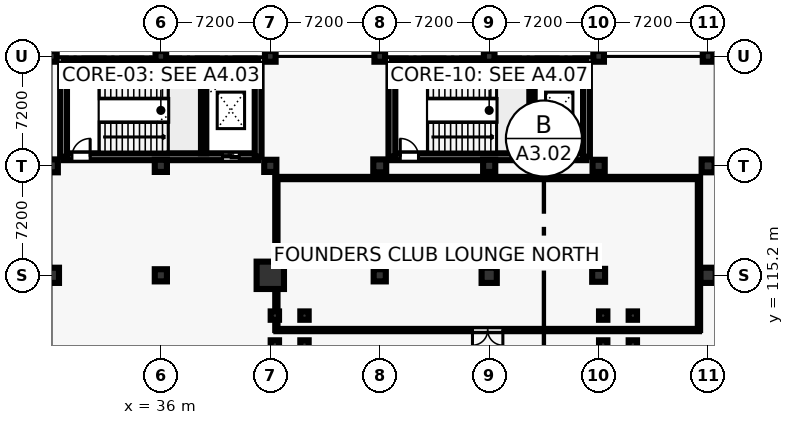
"""IFC4 building model, lengths in metres.
Left out: names, types, materials, properties, quantities, classifications, styles, units other than length and angle.
Written with IfcOpenShell. Run it as: python <this file> out.ifc"""

import sys

from ifc_helpers import new_model, si_unit, direction, frame, frame_2d, origin, origin_2d, place, context, subcontext, project, spatial, rectangle, circle, extrude, element, fill, save


model = new_model("IFC4")
c1 = context("Model", 3, precision=1e-05, world=origin(), true_north=direction((0.0, 1.0)))
c2 = subcontext(c1, "Body", "Model", "MODEL_VIEW")
j1 = project(units=[si_unit("LENGTHUNIT", "METRE"), si_unit("PLANEANGLEUNIT", "RADIAN")], contexts=[c1])
p1 = place(None, origin())
s1 = spatial("IfcSite", under=j1, at=p1, CompositionType="ELEMENT")
p2 = place(p1, origin())
s2 = spatial("IfcBuilding", under=s1, at=p2, CompositionType="ELEMENT")
p3 = place(p2, frame((0.0, 0.0, 5.4)))
s3 = spatial("IfcBuildingStorey", under=s2, at=p3, CompositionType="ELEMENT", Elevation=5.4)
p4 = place(p3, frame((28.8, 115.2, 0.0), z_axis=(0.0, 0.0, 1.0), x_axis=(1.0, 0.0, 0.0)))
e1 = element("IfcColumn", 1, at=p4, inside=s3, PredefinedType="COLUMN", context=c2, shape_type="SweptSolid", body=[
    extrude(circle(Radius=0.5, at=origin_2d()), origin(), (0.0, 0.0, 1.0), 4.2),
])
p5 = place(p3, frame((28.8, 122.4, 0.0), z_axis=(0.0, 0.0, 1.0), x_axis=(1.0, 0.0, 0.0)))
e2 = element("IfcColumn", 2, at=p5, inside=s3, PredefinedType="COLUMN", context=c2, shape_type="SweptSolid", body=[
    extrude(rectangle(XDim=0.85, YDim=0.85, at=origin_2d()), origin(), (0.0, 0.0, 1.0), 4.2),
])
p6 = place(p3, frame((28.8, 129.6, 0.0), z_axis=(0.0, 0.0, 1.0), x_axis=(1.0, 0.0, 0.0)))
e3 = element("IfcColumn", 3, at=p6, inside=s3, PredefinedType="COLUMN", context=c2, shape_type="SweptSolid", body=[
    extrude(rectangle(XDim=0.7, YDim=0.7, at=origin_2d()), origin(), (0.0, 0.0, 1.0), 4.2),
])
p7 = place(p3, frame((36.0, 115.2, 0.0), z_axis=(0.0, 0.0, 1.0), x_axis=(1.0, 0.0, 0.0)))
e4 = element("IfcColumn", 4, at=p7, inside=s3, PredefinedType="COLUMN", context=c2, shape_type="SweptSolid", body=[
    extrude(rectangle(XDim=0.8, YDim=0.8, at=origin_2d()), origin(), (0.0, 0.0, 1.0), 4.2),
])
p8 = place(p3, frame((36.0, 122.4, 0.0), z_axis=(0.0, 0.0, 1.0), x_axis=(1.0, 0.0, 0.0)))
e5 = element("IfcColumn", 5, at=p8, inside=s3, PredefinedType="COLUMN", context=c2, shape_type="SweptSolid", body=[
    extrude(circle(Radius=0.4, at=origin_2d()), origin(), (0.0, 0.0, 1.0), 4.2),
])
p9 = place(p3, frame((36.0, 129.6, 0.0), z_axis=(0.0, 0.0, 1.0), x_axis=(1.0, 0.0, 0.0)))
e6 = element("IfcColumn", 6, at=p9, inside=s3, PredefinedType="COLUMN", context=c2, shape_type="SweptSolid", body=[
    extrude(rectangle(XDim=0.7, YDim=0.7, at=origin_2d()), origin(), (0.0, 0.0, 1.0), 4.2),
])
p10 = place(p3, frame((43.2, 115.2, 0.0), z_axis=(0.0, 0.0, 1.0), x_axis=(1.0, 0.0, 0.0)))
e7 = element("IfcColumn", 7, at=p10, inside=s3, PredefinedType="COLUMN", context=c2, shape_type="SweptSolid", body=[
    extrude(circle(Radius=0.9, at=origin_2d()), origin(), (0.0, 0.0, 1.0), 4.2),
])
p11 = place(p3, frame((43.2, 122.4, 0.0), z_axis=(0.0, 0.0, 1.0), x_axis=(1.0, 0.0, 0.0)))
e8 = element("IfcColumn", 8, at=p11, inside=s3, PredefinedType="COLUMN", context=c2, shape_type="SweptSolid", body=[
    extrude(rectangle(XDim=0.8, YDim=0.8, at=origin_2d()), origin(), (0.0, 0.0, 1.0), 4.2),
])
p12 = place(p3, frame((43.2, 129.6, 0.0), z_axis=(0.0, 0.0, 1.0), x_axis=(1.0, 0.0, 0.0)))
e9 = element("IfcColumn", 9, at=p12, inside=s3, PredefinedType="COLUMN", context=c2, shape_type="SweptSolid", body=[
    extrude(rectangle(XDim=0.7, YDim=0.7, at=origin_2d()), origin(), (0.0, 0.0, 1.0), 4.2),
])
p13 = place(p3, frame((50.4, 115.2, 0.0), z_axis=(0.0, 0.0, 1.0), x_axis=(1.0, 0.0, 0.0)))
e10 = element("IfcColumn", 10, at=p13, inside=s3, PredefinedType="COLUMN", context=c2, shape_type="SweptSolid", body=[
    extrude(circle(Radius=0.4, at=origin_2d()), origin(), (0.0, 0.0, 1.0), 4.2),
])
p14 = place(p3, frame((50.4, 122.4, 0.0), z_axis=(0.0, 0.0, 1.0), x_axis=(1.0, 0.0, 0.0)))
e11 = element("IfcColumn", 11, at=p14, inside=s3, PredefinedType="COLUMN", context=c2, shape_type="SweptSolid", body=[
    extrude(rectangle(XDim=0.85, YDim=0.85, at=origin_2d()), origin(), (0.0, 0.0, 1.0), 4.2),
])
p15 = place(p3, frame((50.4, 129.6, 0.0), z_axis=(0.0, 0.0, 1.0), x_axis=(1.0, 0.0, 0.0)))
e12 = element("IfcColumn", 12, at=p15, inside=s3, PredefinedType="COLUMN", context=c2, shape_type="SweptSolid", body=[
    extrude(rectangle(XDim=0.7, YDim=0.7, at=origin_2d()), origin(), (0.0, 0.0, 1.0), 4.2),
])
p16 = place(p3, frame((57.6, 115.2, 0.0), z_axis=(0.0, 0.0, 1.0), x_axis=(1.0, 0.0, 0.0)))
e13 = element("IfcColumn", 13, at=p16, inside=s3, PredefinedType="COLUMN", context=c2, shape_type="SweptSolid", body=[
    extrude(circle(Radius=0.5, at=origin_2d()), origin(), (0.0, 0.0, 1.0), 4.2),
])
p17 = place(p3, frame((57.6, 122.4, 0.0), z_axis=(0.0, 0.0, 1.0), x_axis=(1.0, 0.0, 0.0)))
e14 = element("IfcColumn", 14, at=p17, inside=s3, PredefinedType="COLUMN", context=c2, shape_type="SweptSolid", body=[
    extrude(circle(Radius=0.4, at=origin_2d()), origin(), (0.0, 0.0, 1.0), 4.2),
])
p18 = place(p3, frame((57.6, 129.6, 0.0), z_axis=(0.0, 0.0, 1.0), x_axis=(1.0, 0.0, 0.0)))
e15 = element("IfcColumn", 15, at=p18, inside=s3, PredefinedType="COLUMN", context=c2, shape_type="SweptSolid", body=[
    extrude(rectangle(XDim=0.7, YDim=0.7, at=origin_2d()), origin(), (0.0, 0.0, 1.0), 4.2),
])
p19 = place(p3, frame((64.8, 115.2, 0.0), z_axis=(0.0, 0.0, 1.0), x_axis=(1.0, 0.0, 0.0)))
e16 = element("IfcColumn", 16, at=p19, inside=s3, PredefinedType="COLUMN", context=c2, shape_type="SweptSolid", body=[
    extrude(rectangle(XDim=0.85, YDim=0.85, at=origin_2d()), origin(), (0.0, 0.0, 1.0), 4.2),
])
p20 = place(p3, frame((64.8, 122.4, 0.0), z_axis=(0.0, 0.0, 1.0), x_axis=(1.0, 0.0, 0.0)))
e17 = element("IfcColumn", 17, at=p20, inside=s3, PredefinedType="COLUMN", context=c2, shape_type="SweptSolid", body=[
    extrude(rectangle(XDim=0.8, YDim=0.8, at=origin_2d()), origin(), (0.0, 0.0, 1.0), 4.2),
])
p21 = place(p3, frame((64.8, 129.6, 0.0), z_axis=(0.0, 0.0, 1.0), x_axis=(1.0, 0.0, 0.0)))
e18 = element("IfcColumn", 18, at=p21, inside=s3, PredefinedType="COLUMN", context=c2, shape_type="SweptSolid", body=[
    extrude(rectangle(XDim=0.7, YDim=0.7, at=origin_2d()), origin(), (0.0, 0.0, 1.0), 4.2),
])
p22 = place(p3, frame((72.0, 115.2, 0.0), z_axis=(0.0, 0.0, 1.0), x_axis=(1.0, 0.0, 0.0)))
e19 = element("IfcColumn", 19, at=p22, inside=s3, PredefinedType="COLUMN", context=c2, shape_type="SweptSolid", body=[
    extrude(circle(Radius=0.5, at=origin_2d()), origin(), (0.0, 0.0, 1.0), 4.2),
])
p23 = place(p3, frame((72.0, 122.4, 0.0), z_axis=(0.0, 0.0, 1.0), x_axis=(1.0, 0.0, 0.0)))
e20 = element("IfcColumn", 20, at=p23, inside=s3, PredefinedType="COLUMN", context=c2, shape_type="SweptSolid", body=[
    extrude(rectangle(XDim=0.85, YDim=0.85, at=origin_2d()), origin(), (0.0, 0.0, 1.0), 4.2),
])
p24 = place(p3, frame((72.0, 129.6, 0.0), z_axis=(0.0, 0.0, 1.0), x_axis=(1.0, 0.0, 0.0)))
e21 = element("IfcColumn", 21, at=p24, inside=s3, PredefinedType="COLUMN", context=c2, shape_type="SweptSolid", body=[
    extrude(rectangle(XDim=0.7, YDim=0.7, at=origin_2d()), origin(), (0.0, 0.0, 1.0), 4.2),
])
p25 = place(p3, frame((29.6, 123.0, 0.0), z_axis=(0.0, 0.0, 1.0), x_axis=(1.0, 0.0, 0.0)))
e22 = element("IfcWall", 22, at=p25, inside=s3, PredefinedType="SHEAR", context=c2, shape_type="SweptSolid", body=[
    extrude(rectangle(XDim=12.8, YDim=0.45, at=frame_2d((6.4, 0.0))), origin(), (0.0, 0.0, 1.0), 3.92),
])
p26 = place(p25, frame((0.55, 0.0, 0.0)))
e23 = element("IfcOpeningElement", 23, at=p26, cuts=e22, PredefinedType="OPENING", context=c2, shape_type="SweptSolid", body=[
    extrude(rectangle(XDim=1.2, YDim=2.25, at=frame_2d((0.6, 1.125))), frame((0.0, 0.235, 0.0), z_axis=(0.0, -1.0, 0.0), x_axis=(1.0, 0.0, 0.0)), (0.0, 0.0, 1.0), 0.47),
])
p27 = place(p25, frame((10.458, 0.0, 0.0)))
e24 = element("IfcOpeningElement", 24, at=p27, cuts=e22, PredefinedType="OPENING", context=c2, shape_type="SweptSolid", body=[
    extrude(rectangle(XDim=1.1, YDim=2.2, at=frame_2d((0.55, 1.1))), frame((0.0, 0.235, 0.0), z_axis=(0.0, -1.0, 0.0), x_axis=(1.0, 0.0, 0.0)), (0.0, 0.0, 1.0), 0.47),
])
p28 = place(p3, frame((29.6, 129.1, 0.0), z_axis=(0.0, 0.0, 1.0), x_axis=(1.0, 0.0, 0.0)))
e25 = element("IfcWall", 25, at=p28, inside=s3, PredefinedType="SHEAR", context=c2, shape_type="SweptSolid", body=[
    extrude(rectangle(XDim=12.8, YDim=0.45, at=frame_2d((6.4, 0.0))), origin(), (0.0, 0.0, 1.0), 3.92),
])
for number, where, z_axis, x_axis in (
    (26, (29.6, 123.0, 0.0), (0.0, 0.0, 1.0), (0.0, 1.0, 0.0)),
    (27, (42.4, 123.0, 0.0), (0.0, 0.0, 1.0), (0.0, 1.0, 0.0)),
):
    element("IfcWall", number, at=place(p3, frame(where, z_axis=z_axis, x_axis=x_axis)), inside=s3, PredefinedType="SHEAR", context=c2, shape_type="SweptSolid", body=[
        extrude(rectangle(XDim=6.1, YDim=0.45, at=frame_2d((3.05, 0.0))), origin(), (0.0, 0.0, 1.0), 3.92),
    ])
p29 = place(p3, frame((38.816, 123.225, 0.0), z_axis=(0.0, 0.0, 1.0), x_axis=(0.0, 1.0, 0.0)))
e28 = element("IfcWall", 28, at=p29, inside=s3, PredefinedType="SHEAR", context=c2, shape_type="SweptSolid", body=[
    extrude(rectangle(XDim=5.65, YDim=0.35, at=frame_2d((2.825, 0.0))), origin(), (0.0, 0.0, 1.0), 3.92),
])
p30 = place(p3, frame((51.2, 123.0, 0.0), z_axis=(0.0, 0.0, 1.0), x_axis=(1.0, 0.0, 0.0)))
e29 = element("IfcWall", 29, at=p30, inside=s3, PredefinedType="SHEAR", context=c2, shape_type="SweptSolid", body=[
    extrude(rectangle(XDim=12.8, YDim=0.45, at=frame_2d((6.4, 0.0))), origin(), (0.0, 0.0, 1.0), 3.92),
])
p31 = place(p30, frame((0.55, 0.0, 0.0)))
e30 = element("IfcOpeningElement", 30, at=p31, cuts=e29, PredefinedType="OPENING", context=c2, shape_type="SweptSolid", body=[
    extrude(rectangle(XDim=1.2, YDim=2.25, at=frame_2d((0.6, 1.125))), frame((0.0, 0.235, 0.0), z_axis=(0.0, -1.0, 0.0), x_axis=(1.0, 0.0, 0.0)), (0.0, 0.0, 1.0), 0.47),
])
p32 = place(p30, frame((10.458, 0.0, 0.0)))
e31 = element("IfcOpeningElement", 31, at=p32, cuts=e29, PredefinedType="OPENING", context=c2, shape_type="SweptSolid", body=[
    extrude(rectangle(XDim=1.1, YDim=2.2, at=frame_2d((0.55, 1.1))), frame((0.0, 0.235, 0.0), z_axis=(0.0, -1.0, 0.0), x_axis=(1.0, 0.0, 0.0)), (0.0, 0.0, 1.0), 0.47),
])
p33 = place(p3, frame((51.2, 129.1, 0.0), z_axis=(0.0, 0.0, 1.0), x_axis=(1.0, 0.0, 0.0)))
e32 = element("IfcWall", 32, at=p33, inside=s3, PredefinedType="SHEAR", context=c2, shape_type="SweptSolid", body=[
    extrude(rectangle(XDim=12.8, YDim=0.45, at=frame_2d((6.4, 0.0))), origin(), (0.0, 0.0, 1.0), 3.92),
])
for number, where, z_axis, x_axis in (
    (33, (51.2, 123.0, 0.0), (0.0, 0.0, 1.0), (0.0, 1.0, 0.0)),
    (34, (64.0, 123.0, 0.0), (0.0, 0.0, 1.0), (0.0, 1.0, 0.0)),
):
    element("IfcWall", number, at=place(p3, frame(where, z_axis=z_axis, x_axis=x_axis)), inside=s3, PredefinedType="SHEAR", context=c2, shape_type="SweptSolid", body=[
        extrude(rectangle(XDim=6.1, YDim=0.45, at=frame_2d((3.05, 0.0))), origin(), (0.0, 0.0, 1.0), 3.92),
    ])
p34 = place(p3, frame((60.416, 123.225, 0.0), z_axis=(0.0, 0.0, 1.0), x_axis=(0.0, 1.0, 0.0)))
e35 = element("IfcWall", 35, at=p34, inside=s3, PredefinedType="SHEAR", context=c2, shape_type="SweptSolid", body=[
    extrude(rectangle(XDim=5.65, YDim=0.35, at=frame_2d((2.825, 0.0))), origin(), (0.0, 0.0, 1.0), 3.92),
])
for number, where, z_axis, x_axis in (
    (36, (43.5, 110.65, 0.0), (0.0, 0.0, 1.0), (1.0, 0.0, 0.0)),
    (37, (45.45, 110.65, 0.0), (0.0, 0.0, 1.0), (1.0, 0.0, 0.0)),
    (38, (43.5, 112.55, 0.0), (0.0, 0.0, 1.0), (1.0, 0.0, 0.0)),
    (39, (45.45, 112.55, 0.0), (0.0, 0.0, 1.0), (1.0, 0.0, 0.0)),
    (40, (65.1, 110.65, 0.0), (0.0, 0.0, 1.0), (1.0, 0.0, 0.0)),
    (41, (67.05, 110.65, 0.0), (0.0, 0.0, 1.0), (1.0, 0.0, 0.0)),
    (42, (65.1, 112.55, 0.0), (0.0, 0.0, 1.0), (1.0, 0.0, 0.0)),
    (43, (67.05, 112.55, 0.0), (0.0, 0.0, 1.0), (1.0, 0.0, 0.0)),
):
    element("IfcColumn", number, at=place(p3, frame(where, z_axis=z_axis, x_axis=x_axis)), inside=s3, PredefinedType="COLUMN", context=c2, shape_type="SweptSolid", body=[
        extrude(rectangle(XDim=0.55, YDim=0.55, at=origin_2d()), origin(), (0.0, 0.0, 1.0), 4.2),
    ])
p35 = place(p3, frame((43.6, 111.6, 0.0), z_axis=(0.0, 0.0, 1.0), x_axis=(1.0, 0.0, 0.0)))
e44 = element("IfcWall", 44, at=p35, inside=s3, PredefinedType="PARTITIONING", context=c2, shape_type="SweptSolid", body=[
    extrude(rectangle(XDim=27.8, YDim=0.15, at=frame_2d((13.9, 0.0))), origin(), (0.0, 0.0, 1.0), 2.98),
])
p36 = place(p35, frame((12.9, 0.0, 0.0)))
e45 = element("IfcOpeningElement", 45, at=p36, cuts=e44, PredefinedType="OPENING", context=c2, shape_type="SweptSolid", body=[
    extrude(rectangle(XDim=2.0, YDim=2.4, at=frame_2d((1.0, 1.2))), frame((0.0, 0.085, 0.0), z_axis=(0.0, -1.0, 0.0), x_axis=(1.0, 0.0, 0.0)), (0.0, 0.0, 1.0), 0.17),
])
p37 = place(p3, frame((71.4, 111.6, 0.0), z_axis=(0.0, 0.0, 1.0), x_axis=(0.0, 1.0, 0.0)))
e46 = element("IfcWall", 46, at=p37, inside=s3, PredefinedType="PARTITIONING", context=c2, shape_type="SweptSolid", body=[
    extrude(rectangle(XDim=10.0, YDim=0.15, at=frame_2d((5.0, 0.0))), origin(), (0.0, 0.0, 1.0), 2.98),
])
p38 = place(p3, frame((71.4, 121.6, 0.0), z_axis=(0.0, 0.0, 1.0), x_axis=(-1.0, 0.0, 0.0)))
e47 = element("IfcWall", 47, at=p38, inside=s3, PredefinedType="PARTITIONING", context=c2, shape_type="SweptSolid", body=[
    extrude(rectangle(XDim=27.8, YDim=0.15, at=frame_2d((13.9, 0.0))), origin(), (0.0, 0.0, 1.0), 2.98),
])
p39 = place(p3, frame((43.6, 121.6, 0.0), z_axis=(0.0, 0.0, 1.0), x_axis=(0.0, -1.0, 0.0)))
e48 = element("IfcWall", 48, at=p39, inside=s3, PredefinedType="PARTITIONING", context=c2, shape_type="SweptSolid", body=[
    extrude(rectangle(XDim=10.0, YDim=0.15, at=frame_2d((5.0, 0.0))), origin(), (0.0, 0.0, 1.0), 2.98),
])
p40 = place(p26, origin())
e49 = element("IfcDoor", 49, at=p40, inside=s3, OperationType="SINGLE_SWING_RIGHT", PredefinedType="DOOR", context=c2, shape_type="SweptSolid", body=[
    extrude(rectangle(XDim=1.2, YDim=2.25, at=frame_2d((0.6, 1.125))), frame((0.0, 0.025, 0.0), z_axis=(0.0, -1.0, 0.0), x_axis=(1.0, 0.0, 0.0)), (0.0, 0.0, 1.0), 0.05),
])
fill(e23, e49)
p41 = place(p27, origin())
e50 = element("IfcDoor", 50, at=p41, inside=s3, OperationType="SLIDING_TO_LEFT", PredefinedType="DOOR", context=c2, shape_type="SweptSolid", body=[
    extrude(rectangle(XDim=1.1, YDim=2.2, at=frame_2d((0.55, 1.1))), frame((0.0, 0.025, 0.0), z_axis=(0.0, -1.0, 0.0), x_axis=(1.0, 0.0, 0.0)), (0.0, 0.0, 1.0), 0.05),
])
fill(e24, e50)
p42 = place(p31, origin())
e51 = element("IfcDoor", 51, at=p42, inside=s3, OperationType="SINGLE_SWING_LEFT", PredefinedType="DOOR", context=c2, shape_type="SweptSolid", body=[
    extrude(rectangle(XDim=1.2, YDim=2.25, at=frame_2d((0.6, 1.125))), frame((0.0, 0.025, 0.0), z_axis=(0.0, -1.0, 0.0), x_axis=(1.0, 0.0, 0.0)), (0.0, 0.0, 1.0), 0.05),
])
fill(e30, e51)
p43 = place(p32, origin())
e52 = element("IfcDoor", 52, at=p43, inside=s3, OperationType="SLIDING_TO_RIGHT", PredefinedType="DOOR", context=c2, shape_type="SweptSolid", body=[
    extrude(rectangle(XDim=1.1, YDim=2.2, at=frame_2d((0.55, 1.1))), frame((0.0, 0.025, 0.0), z_axis=(0.0, -1.0, 0.0), x_axis=(1.0, 0.0, 0.0)), (0.0, 0.0, 1.0), 0.05),
])
fill(e31, e52)
p44 = place(p36, frame((2.0, 0.0, 0.0), z_axis=(0.0, 0.0, 1.0), x_axis=(-1.0, 0.0, 0.0)))
e53 = element("IfcDoor", 53, at=p44, inside=s3, OperationType="DOUBLE_DOOR_SINGLE_SWING", PredefinedType="DOOR", context=c2, shape_type="SweptSolid", body=[
    extrude(rectangle(XDim=2.0, YDim=2.4, at=frame_2d((1.0, 1.2))), frame((0.0, 0.025, 0.0), z_axis=(0.0, -1.0, 0.0), x_axis=(1.0, 0.0, 0.0)), (0.0, 0.0, 1.0), 0.05),
])
fill(e45, e53)
save(model, sys.argv[1])
